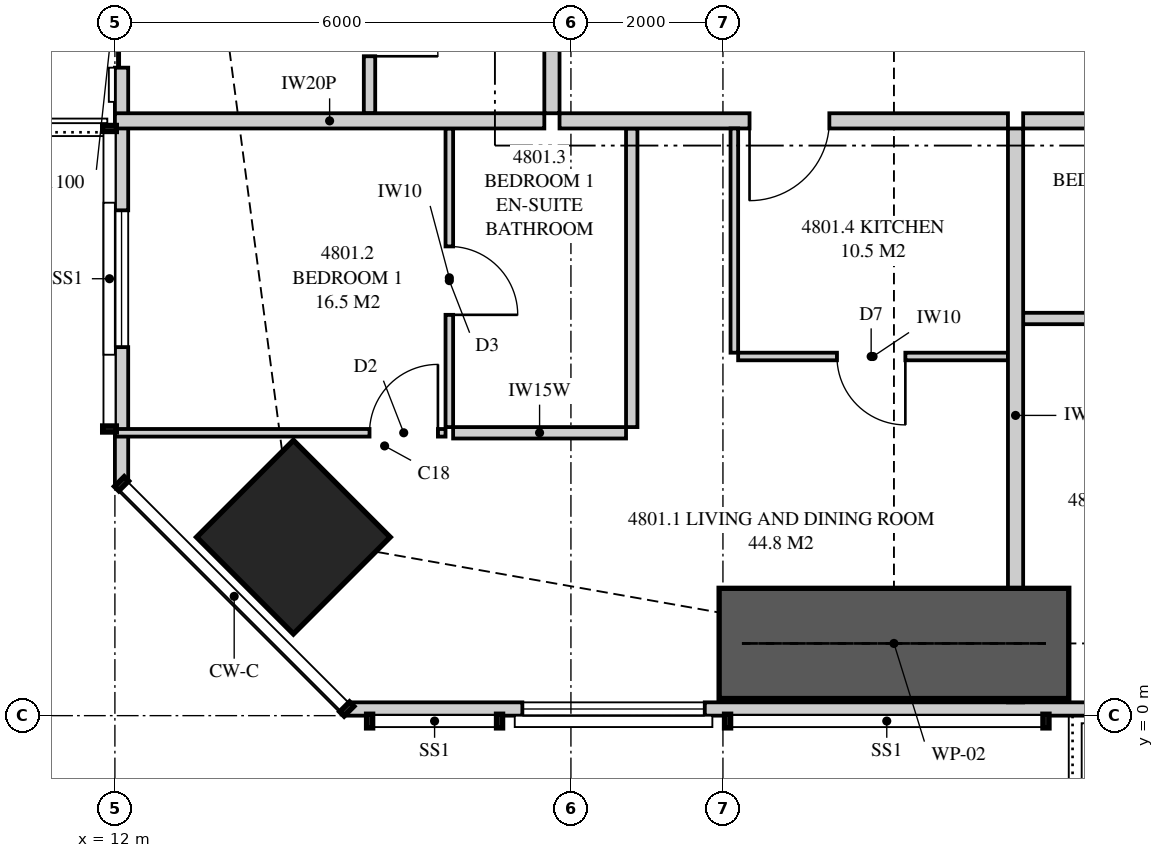
"""IFC4 building model, lengths in metres.
Left out: names, types, materials, properties, quantities, classifications, styles, units other than length and angle.
Written with IfcOpenShell. Run it as: python <this file> out.ifc"""

import sys

from ifc_helpers import new_model, si_unit, direction, frame, frame_2d, origin, origin_2d, place, context, subcontext, project, spatial, polyline, rectangle, outline, extrude, element, fill, save


model = new_model("IFC4")
c1 = context("Model", 3, precision=1e-05, world=origin(), true_north=direction((0.0, 1.0)))
c2 = subcontext(c1, "Body", "Model", "MODEL_VIEW")
j1 = project(units=[si_unit("LENGTHUNIT", "METRE"), si_unit("PLANEANGLEUNIT", "RADIAN")], contexts=[c1])
p1 = place(None, origin())
s1 = spatial("IfcSite", under=j1, at=p1, CompositionType="ELEMENT")
p2 = place(p1, origin())
s2 = spatial("IfcBuilding", under=s1, at=p2, CompositionType="ELEMENT")
p3 = place(p2, frame((0.0, 0.0, 177.8)))
s3 = spatial("IfcBuildingStorey", under=s2, at=p3, CompositionType="ELEMENT", Elevation=177.8)
p4 = place(p3, frame((14.348, 2.348, 0.0), z_axis=(0.0, 0.0, 1.0), x_axis=(0.707106781187, 0.707106781187, 0.0)))
e1 = element("IfcColumn", 1, at=p4, inside=s3, PredefinedType="COLUMN", context=c2, shape_type="SweptSolid", body=[
    extrude(rectangle(XDim=1.8, YDim=1.8, at=origin_2d()), origin(), (0.0, 0.0, 1.0), 3.35),
])
p5 = place(p3, frame((15.051, 0.087, 0.0), z_axis=(0.0, 0.0, 1.0), x_axis=(1.0, 0.0, 0.0)))
e2 = element("IfcWall", 2, at=p5, inside=s3, PredefinedType="SOLIDWALL", context=c2, shape_type="SweptSolid", body=[
    extrude(outline(polyline([(0.0, 0.0), (34.897, 0.0), (34.897, 3.11), (27.91, 3.11), (27.91, 2.15), (27.836, 2.15), (27.836, 3.11), (27.699, 3.11), (27.699, 2.15), (7.199, 2.15), (7.199, 3.11), (7.062, 3.11), (7.062, 2.15), (6.987, 2.15), (6.987, 3.11), (0.0, 3.11), (0.0, 0.0)])), frame((0.0, 0.087, 0.0), z_axis=(0.0, -1.0, 0.0), x_axis=(1.0, 0.0, 0.0)), (0.0, 0.0, 1.0), 0.175),
])
p6 = place(p5, frame((2.31, 0.0, 0.4)))
e3 = element("IfcOpeningElement", 3, at=p6, cuts=e2, PredefinedType="OPENING", context=c2, shape_type="SweptSolid", body=[
    extrude(rectangle(XDim=2.4, YDim=1.7, at=frame_2d((1.2, 0.85))), frame((0.0, 0.097, 0.0), z_axis=(0.0, -1.0, 0.0), x_axis=(1.0, 0.0, 0.0)), (0.0, 0.0, 1.0), 0.195),
])
p7 = place(p5, frame((10.399, 0.0, 0.0)))
e4 = element("IfcOpeningElement", 4, at=p7, cuts=e2, PredefinedType="OPENING", context=c2, shape_type="SweptSolid", body=[
    extrude(rectangle(XDim=1.8, YDim=2.1, at=frame_2d((0.9, 1.05))), frame((0.0, 0.097, 0.0), z_axis=(0.0, -1.0, 0.0), x_axis=(1.0, 0.0, 0.0)), (0.0, 0.0, 1.0), 0.195),
])
p8 = place(p5, frame((12.649, 0.0, 0.4)))
e5 = element("IfcOpeningElement", 5, at=p8, cuts=e2, PredefinedType="OPENING", context=c2, shape_type="SweptSolid", body=[
    extrude(rectangle(XDim=2.4, YDim=1.7, at=frame_2d((1.2, 0.85))), frame((0.0, 0.097, 0.0), z_axis=(0.0, -1.0, 0.0), x_axis=(1.0, 0.0, 0.0)), (0.0, 0.0, 1.0), 0.195),
])
p9 = place(p5, frame((19.874, 0.0, 0.4)))
e6 = element("IfcOpeningElement", 6, at=p9, cuts=e2, PredefinedType="OPENING", context=c2, shape_type="SweptSolid", body=[
    extrude(rectangle(XDim=1.8, YDim=1.7, at=frame_2d((0.9, 0.85))), frame((0.0, 0.097, 0.0), z_axis=(0.0, -1.0, 0.0), x_axis=(1.0, 0.0, 0.0)), (0.0, 0.0, 1.0), 0.195),
])
p10 = place(p5, frame((22.799, 0.0, 0.0)))
e7 = element("IfcOpeningElement", 7, at=p10, cuts=e2, PredefinedType="OPENING", context=c2, shape_type="SweptSolid", body=[
    extrude(rectangle(XDim=1.8, YDim=2.1, at=frame_2d((0.9, 1.05))), frame((0.0, 0.097, 0.0), z_axis=(0.0, -1.0, 0.0), x_axis=(1.0, 0.0, 0.0)), (0.0, 0.0, 1.0), 0.195),
])
p11 = place(p5, frame((30.205, 0.0, 0.4)))
e8 = element("IfcOpeningElement", 8, at=p11, cuts=e2, PredefinedType="OPENING", context=c2, shape_type="SweptSolid", body=[
    extrude(rectangle(XDim=2.4, YDim=1.7, at=frame_2d((1.2, 0.85))), frame((0.0, 0.097, 0.0), z_axis=(0.0, -1.0, 0.0), x_axis=(1.0, 0.0, 0.0)), (0.0, 0.0, 1.0), 0.195),
])
p12 = place(p3, frame((12.087, 32.949, 0.0), z_axis=(0.0, 0.0, 1.0), x_axis=(0.0, -1.0, 0.0)))
e9 = element("IfcWall", 9, at=p12, inside=s3, PredefinedType="SOLIDWALL", context=c2, shape_type="SweptSolid", body=[
    extrude(outline(polyline([(0.0, 0.0), (29.897, 0.0), (29.897, 3.11), (20.191, 3.11), (20.191, 2.15), (20.051, 2.15), (20.051, 3.11), (19.949, 3.11), (19.949, 2.15), (7.949, 2.15), (7.949, 3.11), (7.823, 3.11), (7.823, 2.15), (7.73, 2.15), (7.73, 3.11), (0.0, 3.11), (0.0, 0.0)])), frame((0.0, 0.087, 0.0), z_axis=(0.0, -1.0, 0.0), x_axis=(1.0, 0.0, 0.0)), (0.0, 0.0, 1.0), 0.175),
])
p13 = place(p12, frame((1.237, 0.0, 0.4)))
e10 = element("IfcOpeningElement", 10, at=p13, cuts=e9, PredefinedType="OPENING", context=c2, shape_type="SweptSolid", body=[
    extrude(rectangle(XDim=1.2, YDim=1.7, at=frame_2d((0.6, 0.85))), frame((0.0, 0.097, 0.0), z_axis=(0.0, -1.0, 0.0), x_axis=(1.0, 0.0, 0.0)), (0.0, 0.0, 1.0), 0.195),
])
p14 = place(p12, frame((10.482, 0.0, 0.4)))
e11 = element("IfcOpeningElement", 11, at=p14, cuts=e9, PredefinedType="OPENING", context=c2, shape_type="SweptSolid", body=[
    extrude(rectangle(XDim=2.4, YDim=1.7, at=frame_2d((1.2, 0.85))), frame((0.0, 0.097, 0.0), z_axis=(0.0, -1.0, 0.0), x_axis=(1.0, 0.0, 0.0)), (0.0, 0.0, 1.0), 0.195),
])
p15 = place(p12, frame((15.735, 0.0, 0.4)))
e12 = element("IfcOpeningElement", 12, at=p15, cuts=e9, PredefinedType="OPENING", context=c2, shape_type="SweptSolid", body=[
    extrude(rectangle(XDim=1.8, YDim=1.7, at=frame_2d((0.9, 0.85))), frame((0.0, 0.097, 0.0), z_axis=(0.0, -1.0, 0.0), x_axis=(1.0, 0.0, 0.0)), (0.0, 0.0, 1.0), 0.195),
])
p16 = place(p12, frame((22.624, 0.0, 0.0)))
e13 = element("IfcOpeningElement", 13, at=p16, cuts=e9, PredefinedType="OPENING", context=c2, shape_type="SweptSolid", body=[
    extrude(rectangle(XDim=1.8, YDim=2.1, at=frame_2d((0.9, 1.05))), frame((0.0, 0.097, 0.0), z_axis=(0.0, -1.0, 0.0), x_axis=(1.0, 0.0, 0.0)), (0.0, 0.0, 1.0), 0.195),
])
p17 = place(p12, frame((26.301, 0.0, 0.4)))
e14 = element("IfcOpeningElement", 14, at=p17, cuts=e9, PredefinedType="OPENING", context=c2, shape_type="SweptSolid", body=[
    extrude(rectangle(XDim=1.8, YDim=1.7, at=frame_2d((0.9, 0.85))), frame((0.0, 0.097, 0.0), z_axis=(0.0, -1.0, 0.0), x_axis=(1.0, 0.0, 0.0)), (0.0, 0.0, 1.0), 0.195),
])
p18 = place(p3, frame((23.85, 0.175, 0.0), z_axis=(0.0, 0.0, 1.0), x_axis=(0.0, 1.0, 0.0)))
e15 = element("IfcWall", 15, at=p18, inside=s3, PredefinedType="PARTITIONING", context=c2, shape_type="SweptSolid", body=[
    extrude(outline(polyline([(0.529, 2.15), (0.0, 2.15), (0.0, 0.0), (0.529, 0.0), (0.529, 0.206), (1.021, 0.206), (1.021, 0.0), (7.55, 0.0), (7.55, 3.11), (1.685, 3.11), (1.685, 2.15), (1.021, 2.15), (1.021, 1.944), (0.529, 1.944), (0.529, 2.15)])), frame((0.0, 0.1, 0.0), z_axis=(0.0, -1.0, 0.0), x_axis=(1.0, 0.0, 0.0)), (0.0, 0.0, 1.0), 0.2),
])
p19 = place(p3, frame((17.85, 7.825, 0.0), z_axis=(0.0, 0.0, 1.0), x_axis=(1.0, 0.0, 0.0)))
e16 = element("IfcWall", 16, at=p19, inside=s3, PredefinedType="PARTITIONING", context=c2, shape_type="SweptSolid", body=[
    extrude(outline(polyline([(0.0, 0.0), (5.9, 0.0), (5.9, 3.11), (4.737, 3.11), (4.737, 2.541), (4.062, 2.541), (4.062, 3.11), (0.0, 3.11), (0.0, 0.0)])), frame((0.0, 0.1, 0.0), z_axis=(0.0, -1.0, 0.0), x_axis=(1.0, 0.0, 0.0)), (0.0, 0.0, 1.0), 0.2),
])
p20 = place(p19, frame((2.5, 0.0, 0.0)))
e17 = element("IfcOpeningElement", 17, at=p20, cuts=e16, PredefinedType="OPENING", context=c2, shape_type="SweptSolid", body=[
    extrude(rectangle(XDim=1.05, YDim=2.2, at=frame_2d((0.525, 1.1))), frame((0.0, 0.11, 0.0), z_axis=(0.0, -1.0, 0.0), x_axis=(1.0, 0.0, 0.0)), (0.0, 0.0, 1.0), 0.22),
])
p21 = place(p3, frame((16.4, 3.796, 0.0), z_axis=(0.0, 0.0, 1.0), x_axis=(0.0, 1.0, 0.0)))
e18 = element("IfcWall", 18, at=p21, inside=s3, PredefinedType="PARTITIONING", context=c2, shape_type="SweptSolid", body=[
    extrude(rectangle(XDim=3.929, YDim=0.1, at=frame_2d((1.964, 0.0))), origin(), (0.0, 0.0, 1.0), 3.11),
])
p22 = place(p21, frame((1.477, 0.0, 0.0)))
e19 = element("IfcOpeningElement", 19, at=p22, cuts=e18, PredefinedType="OPENING", context=c2, shape_type="SweptSolid", body=[
    extrude(rectangle(XDim=0.9, YDim=2.1, at=frame_2d((0.45, 1.05))), frame((0.0, 0.06, 0.0), z_axis=(0.0, -1.0, 0.0), x_axis=(1.0, 0.0, 0.0)), (0.0, 0.0, 1.0), 0.12),
])
p23 = place(p3, frame((16.35, 3.721, 0.0), z_axis=(0.0, 0.0, 1.0), x_axis=(-1.0, 0.0, 0.0)))
e20 = element("IfcWall", 20, at=p23, inside=s3, PredefinedType="PARTITIONING", context=c2, shape_type="SweptSolid", body=[
    extrude(outline(polyline([(0.0, 0.0), (4.35, 0.0), (4.35, 3.11), (3.049, 3.11), (3.049, 2.15), (1.314, 2.15), (1.314, 3.11), (0.0, 3.11), (0.0, 0.0)])), frame((0.0, 0.05, 0.0), z_axis=(0.0, -1.0, 0.0), x_axis=(1.0, 0.0, 0.0)), (0.0, 0.0, 1.0), 0.1),
])
p24 = place(p23, frame((0.1, 0.0, 0.0)))
e21 = element("IfcOpeningElement", 21, at=p24, cuts=e20, PredefinedType="OPENING", context=c2, shape_type="SweptSolid", body=[
    extrude(rectangle(XDim=0.9, YDim=2.1, at=frame_2d((0.45, 1.05))), frame((0.0, 0.06, 0.0), z_axis=(0.0, -1.0, 0.0), x_axis=(1.0, 0.0, 0.0)), (0.0, 0.0, 1.0), 0.12),
])
p25 = place(p3, frame((18.725, 3.721, 0.0), z_axis=(0.0, 0.0, 1.0), x_axis=(-1.0, 0.0, 0.0)))
e22 = element("IfcWall", 22, at=p25, inside=s3, PredefinedType="PLUMBINGWALL", context=c2, shape_type="SweptSolid", body=[
    extrude(rectangle(XDim=2.275, YDim=0.15, at=frame_2d((1.138, 0.0))), origin(), (0.0, 0.0, 1.0), 3.11),
])
p26 = place(p3, frame((18.8, 3.796, 0.0), z_axis=(0.0, 0.0, 1.0), x_axis=(0.0, 1.0, 0.0)))
e23 = element("IfcWall", 23, at=p26, inside=s3, PredefinedType="PLUMBINGWALL", context=c2, shape_type="SweptSolid", body=[
    extrude(rectangle(XDim=3.929, YDim=0.15, at=frame_2d((1.964, 0.0))), origin(), (0.0, 0.0, 1.0), 3.11),
])
p27 = place(p3, frame((20.2, 4.725, 0.0), z_axis=(0.0, 0.0, 1.0), x_axis=(1.0, 0.0, 0.0)))
e24 = element("IfcWall", 24, at=p27, inside=s3, PredefinedType="PARTITIONING", context=c2, shape_type="SweptSolid", body=[
    extrude(outline(polyline([(0.0, 0.0), (3.55, 0.0), (3.55, 3.11), (2.337, 3.11), (2.337, 2.541), (1.763, 2.541), (1.763, 3.11), (0.0, 3.11), (0.0, 0.0)])), frame((0.0, 0.05, 0.0), z_axis=(0.0, -1.0, 0.0), x_axis=(1.0, 0.0, 0.0)), (0.0, 0.0, 1.0), 0.1),
])
p28 = place(p27, frame((1.3, 0.0, 0.0)))
e25 = element("IfcOpeningElement", 25, at=p28, cuts=e24, PredefinedType="OPENING", context=c2, shape_type="SweptSolid", body=[
    extrude(rectangle(XDim=0.9, YDim=2.1, at=frame_2d((0.45, 1.05))), frame((0.0, 0.06, 0.0), z_axis=(0.0, -1.0, 0.0), x_axis=(1.0, 0.0, 0.0)), (0.0, 0.0, 1.0), 0.12),
])
p29 = place(p3, frame((20.15, 4.775, 0.0), z_axis=(0.0, 0.0, 1.0), x_axis=(0.0, 1.0, 0.0)))
e26 = element("IfcWall", 26, at=p29, inside=s3, PredefinedType="PARTITIONING", context=c2, shape_type="SweptSolid", body=[
    extrude(rectangle(XDim=2.95, YDim=0.1, at=frame_2d((1.475, 0.0))), origin(), (0.0, 0.0, 1.0), 3.11),
])
p30 = place(p3, frame((23.95, 7.825, 0.0), z_axis=(0.0, 0.0, 1.0), x_axis=(1.0, 0.0, 0.0)))
e27 = element("IfcWall", 27, at=p30, inside=s3, PredefinedType="PARTITIONING", context=c2, shape_type="SweptSolid", body=[
    extrude(rectangle(XDim=7.375, YDim=0.2, at=frame_2d((3.688, 0.0))), origin(), (0.0, 0.0, 1.0), 3.11),
])
p31 = place(p3, frame((23.95, 5.225, 0.0), z_axis=(0.0, 0.0, 1.0), x_axis=(1.0, 0.0, 0.0)))
e28 = element("IfcWall", 28, at=p31, inside=s3, PredefinedType="PLUMBINGWALL", context=c2, shape_type="SweptSolid", body=[
    extrude(rectangle(XDim=3.45, YDim=0.15, at=frame_2d((1.725, 0.0))), origin(), (0.0, 0.0, 1.0), 3.11),
])
p32 = place(p31, frame((2.15, 0.0, 0.0)))
e29 = element("IfcOpeningElement", 29, at=p32, cuts=e28, PredefinedType="OPENING", context=c2, shape_type="SweptSolid", body=[
    extrude(rectangle(XDim=0.9, YDim=2.1, at=frame_2d((0.45, 1.05))), frame((0.0, 0.085, 0.0), z_axis=(0.0, -1.0, 0.0), x_axis=(1.0, 0.0, 0.0)), (0.0, 0.0, 1.0), 0.17),
])
p33 = place(p3, frame((12.0, 7.825, 0.0), z_axis=(0.0, 0.0, 1.0), x_axis=(1.0, 0.0, 0.0)))
e30 = element("IfcWall", 30, at=p33, inside=s3, PredefinedType="PARTITIONING", context=c2, shape_type="SweptSolid", body=[
    extrude(outline(polyline([(0.0, 0.0), (5.65, 0.0), (5.65, 3.11), (2.547, 3.11), (2.547, 2.15), (0.712, 2.15), (0.712, 3.11), (0.0, 3.11), (0.0, 0.0)])), frame((0.0, 0.1, 0.0), z_axis=(0.0, -1.0, 0.0), x_axis=(1.0, 0.0, 0.0)), (0.0, 0.0, 1.0), 0.2),
])
p34 = place(p3, frame((17.75, 7.925, 0.0), z_axis=(0.0, 0.0, 1.0), x_axis=(0.0, 1.0, 0.0)))
e31 = element("IfcWall", 31, at=p34, inside=s3, PredefinedType="PARTITIONING", context=c2, shape_type="SweptSolid", body=[
    extrude(outline(polyline([(0.0, 0.0), (5.825, 0.0), (5.825, 3.11), (5.412, 3.11), (5.412, 2.541), (4.738, 2.541), (4.738, 3.11), (0.0, 3.11), (0.0, 0.0)])), frame((0.0, 0.1, 0.0), z_axis=(0.0, -1.0, 0.0), x_axis=(1.0, 0.0, 0.0)), (0.0, 0.0, 1.0), 0.2),
])
p35 = place(p34, frame((2.413, 0.0, 0.0)))
e32 = element("IfcOpeningElement", 32, at=p35, cuts=e31, PredefinedType="OPENING", context=c2, shape_type="SweptSolid", body=[
    extrude(rectangle(XDim=1.05, YDim=2.2, at=frame_2d((0.525, 1.1))), frame((0.0, 0.11, 0.0), z_axis=(0.0, -1.0, 0.0), x_axis=(1.0, 0.0, 0.0)), (0.0, 0.0, 1.0), 0.22),
])
p36 = place(p3, frame((15.35, 7.925, 0.0), z_axis=(0.0, 0.0, 1.0), x_axis=(0.0, 1.0, 0.0)))
e33 = element("IfcWall", 33, at=p36, inside=s3, PredefinedType="PLUMBINGWALL", context=c2, shape_type="SweptSolid", body=[
    extrude(rectangle(XDim=2.425, YDim=0.15, at=frame_2d((1.212, 0.0))), origin(), (0.0, 0.0, 1.0), 3.11),
])
p37 = place(p36, frame((0.75, 0.0, 0.0)))
e34 = element("IfcOpeningElement", 34, at=p37, cuts=e33, PredefinedType="OPENING", context=c2, shape_type="SweptSolid", body=[
    extrude(rectangle(XDim=0.9, YDim=2.1, at=frame_2d((0.45, 1.05))), frame((0.0, 0.085, 0.0), z_axis=(0.0, -1.0, 0.0), x_axis=(1.0, 0.0, 0.0)), (0.0, 0.0, 1.0), 0.17),
])
p38 = place(p3, frame((19.95, 0.95, 0.0), z_axis=(0.0, 0.0, 1.0), x_axis=(1.0, 0.0, 0.0)))
e35 = element("IfcWall", 35, at=p38, inside=s3, PredefinedType="SHEAR", context=c2, shape_type="SweptSolid", body=[
    extrude(rectangle(XDim=4.6, YDim=1.45, at=frame_2d((2.3, 0.0))), origin(), (0.0, 0.0, 1.0), 3.35),
])
p39 = place(p6, origin())
e36 = element("IfcWindow", 36, at=p39, inside=s3, PartitioningType="SINGLE_PANEL", PredefinedType="WINDOW", context=c2, shape_type="SweptSolid", body=[
    extrude(rectangle(XDim=2.4, YDim=1.7, at=frame_2d((1.2, 0.85))), frame((0.0, 0.03, 0.0), z_axis=(0.0, -1.0, 0.0), x_axis=(1.0, 0.0, 0.0)), (0.0, 0.0, 1.0), 0.06),
])
fill(e3, e36)
p40 = place(p16, origin())
e37 = element("IfcDoor", 37, at=p40, inside=s3, OperationType="SLIDING_TO_LEFT", PredefinedType="DOOR", context=c2, shape_type="SweptSolid", body=[
    extrude(rectangle(XDim=1.8, YDim=2.1, at=frame_2d((0.9, 1.05))), frame((0.0, 0.025, 0.0), z_axis=(0.0, -1.0, 0.0), x_axis=(1.0, 0.0, 0.0)), (0.0, 0.0, 1.0), 0.05),
])
fill(e13, e37)
p41 = place(p17, origin())
e38 = element("IfcWindow", 38, at=p41, inside=s3, PartitioningType="SINGLE_PANEL", PredefinedType="WINDOW", context=c2, shape_type="SweptSolid", body=[
    extrude(rectangle(XDim=1.8, YDim=1.7, at=frame_2d((0.9, 0.85))), frame((0.0, 0.03, 0.0), z_axis=(0.0, -1.0, 0.0), x_axis=(1.0, 0.0, 0.0)), (0.0, 0.0, 1.0), 0.06),
])
fill(e14, e38)
p42 = place(p20, frame((1.05, 0.0, 0.0), z_axis=(0.0, 0.0, 1.0), x_axis=(-1.0, 0.0, 0.0)))
e39 = element("IfcDoor", 39, at=p42, inside=s3, OperationType="SINGLE_SWING_RIGHT", PredefinedType="DOOR", context=c2, shape_type="SweptSolid", body=[
    extrude(rectangle(XDim=1.05, YDim=2.2, at=frame_2d((0.525, 1.1))), frame((0.0, 0.025, 0.0), z_axis=(0.0, -1.0, 0.0), x_axis=(1.0, 0.0, 0.0)), (0.0, 0.0, 1.0), 0.05),
])
fill(e17, e39)
p43 = place(p24, frame((0.9, 0.0, 0.0), z_axis=(0.0, 0.0, 1.0), x_axis=(-1.0, 0.0, 0.0)))
e40 = element("IfcDoor", 40, at=p43, inside=s3, OperationType="SINGLE_SWING_RIGHT", PredefinedType="DOOR", context=c2, shape_type="SweptSolid", body=[
    extrude(rectangle(XDim=0.9, YDim=2.1, at=frame_2d((0.45, 1.05))), frame((0.0, 0.025, 0.0), z_axis=(0.0, -1.0, 0.0), x_axis=(1.0, 0.0, 0.0)), (0.0, 0.0, 1.0), 0.05),
])
fill(e21, e40)
p44 = place(p22, frame((0.9, 0.0, 0.0), z_axis=(0.0, 0.0, 1.0), x_axis=(-1.0, 0.0, 0.0)))
e41 = element("IfcDoor", 41, at=p44, inside=s3, OperationType="SINGLE_SWING_RIGHT", PredefinedType="DOOR", context=c2, shape_type="SweptSolid", body=[
    extrude(rectangle(XDim=0.9, YDim=2.1, at=frame_2d((0.45, 1.05))), frame((0.0, 0.025, 0.0), z_axis=(0.0, -1.0, 0.0), x_axis=(1.0, 0.0, 0.0)), (0.0, 0.0, 1.0), 0.05),
])
fill(e19, e41)
p45 = place(p28, frame((0.9, 0.0, 0.0), z_axis=(0.0, 0.0, 1.0), x_axis=(-1.0, 0.0, 0.0)))
e42 = element("IfcDoor", 42, at=p45, inside=s3, OperationType="SINGLE_SWING_LEFT", PredefinedType="DOOR", context=c2, shape_type="SweptSolid", body=[
    extrude(rectangle(XDim=0.9, YDim=2.1, at=frame_2d((0.45, 1.05))), frame((0.0, 0.025, 0.0), z_axis=(0.0, -1.0, 0.0), x_axis=(1.0, 0.0, 0.0)), (0.0, 0.0, 1.0), 0.05),
])
fill(e25, e42)
p46 = place(p37, frame((0.9, 0.0, 0.0), z_axis=(0.0, 0.0, 1.0), x_axis=(-1.0, 0.0, 0.0)))
e43 = element("IfcDoor", 43, at=p46, inside=s3, OperationType="SINGLE_SWING_RIGHT", PredefinedType="DOOR", context=c2, shape_type="SweptSolid", body=[
    extrude(rectangle(XDim=0.9, YDim=2.1, at=frame_2d((0.45, 1.05))), frame((0.0, 0.025, 0.0), z_axis=(0.0, -1.0, 0.0), x_axis=(1.0, 0.0, 0.0)), (0.0, 0.0, 1.0), 0.05),
])
fill(e34, e43)
save(model, sys.argv[1])
